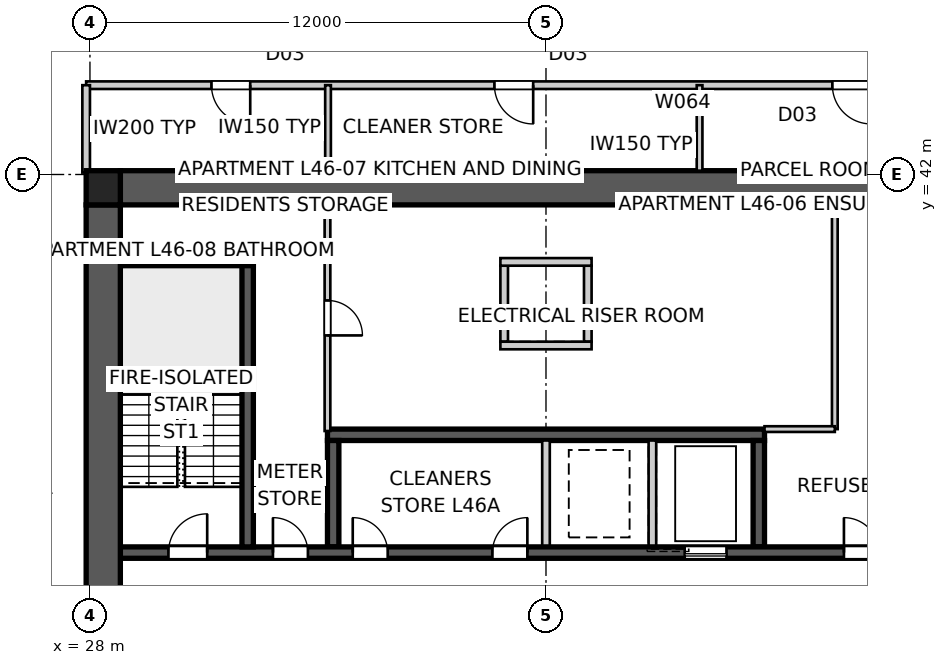
"""IFC4 building model, lengths in metres.
Left out: names, types, materials, properties, quantities, classifications, styles, units other than length and angle.
Written with IfcOpenShell. Run it as: python <this file> out.ifc"""

import sys

from ifc_helpers import new_model, si_unit, direction, frame, frame_2d, origin, origin_2d, place, context, subcontext, project, spatial, polyline, rectangle, outline, extrude, element, fill, save


model = new_model("IFC4")
c1 = context("Model", 3, precision=1e-05, world=origin(), true_north=direction((0.0, 1.0)))
c2 = subcontext(c1, "Body", "Model", "MODEL_VIEW")
j1 = project(units=[si_unit("LENGTHUNIT", "METRE"), si_unit("PLANEANGLEUNIT", "RADIAN")], contexts=[c1])
p1 = place(None, origin())
s1 = spatial("IfcSite", under=j1, at=p1, CompositionType="ELEMENT")
p2 = place(p1, origin())
s2 = spatial("IfcBuilding", under=s1, at=p2, CompositionType="ELEMENT")
p3 = place(p2, frame((0.0, 0.0, 167.6)))
s3 = spatial("IfcBuildingStorey", under=s2, at=p3, CompositionType="ELEMENT", Elevation=167.6)
p4 = place(p3, frame((28.8, 41.65, 0.0), z_axis=(0.0, 0.0, 1.0), x_axis=(1.0, 0.0, 0.0)))
e1 = element("IfcWall", 1, at=p4, inside=s3, PredefinedType="SHEAR", context=c2, shape_type="SweptSolid", body=[
    extrude(outline(polyline([(0.0, -0.45), (22.4, -0.45), (22.4, -0.025), (22.85, -0.025), (22.85, 0.025), (22.4, 0.025), (22.4, 0.45), (0.0, 0.45), (0.0, 0.025), (-0.45, 0.025), (-0.45, -0.025), (0.0, -0.025), (0.0, -0.45)])), origin(), (0.0, 0.0, 1.0), 3.4),
])
p5 = place(p3, frame((28.35, 41.2, 0.0), z_axis=(0.0, 0.0, 1.0), x_axis=(0.0, -1.0, 0.0)))
e2 = element("IfcWall", 2, at=p5, inside=s3, PredefinedType="SHEAR", context=c2, shape_type="SweptSolid", body=[
    extrude(outline(polyline([(0.0, -0.45), (22.4, -0.45), (22.4, -0.025), (22.85, -0.025), (22.85, 0.025), (22.4, 0.025), (22.4, 0.45), (0.0, 0.45), (0.0, 0.025), (-0.45, 0.025), (-0.45, -0.025), (0.0, -0.025), (0.0, -0.45)])), origin(), (0.0, 0.0, 1.0), 3.4),
])
p6 = place(p5, frame((11.14, 0.0, 0.0)))
e3 = element("IfcOpeningElement", 3, at=p6, cuts=e2, PredefinedType="OPENING", context=c2, shape_type="SweptSolid", body=[
    extrude(rectangle(XDim=1.02, YDim=2.4, at=frame_2d((0.51, 1.2))), frame((0.0, 0.46, 0.0), z_axis=(0.0, -1.0, 0.0), x_axis=(1.0, 0.0, 0.0)), (0.0, 0.0, 1.0), 0.92),
])
p7 = place(p3, frame((28.8, 32.05, 0.0), z_axis=(0.0, 0.0, 1.0), x_axis=(1.0, 0.0, 0.0)))
e4 = element("IfcWall", 4, at=p7, inside=s3, PredefinedType="SHEAR", context=c2, shape_type="SweptSolid", body=[
    extrude(rectangle(XDim=22.4, YDim=0.3, at=frame_2d((11.2, 0.0))), origin(), (0.0, 0.0, 1.0), 3.4),
])
p8 = place(p7, frame((19.04, 0.0, 0.0)))
e5 = element("IfcOpeningElement", 5, at=p8, cuts=e4, PredefinedType="OPENING", context=c2, shape_type="SweptSolid", body=[
    extrude(rectangle(XDim=0.92, YDim=2.1, at=frame_2d((0.46, 1.05))), frame((0.0, 0.16, 0.0), z_axis=(0.0, -1.0, 0.0), x_axis=(1.0, 0.0, 0.0)), (0.0, 0.0, 1.0), 0.32),
])
p9 = place(p7, frame((1.265, 0.0, 0.0)))
e6 = element("IfcOpeningElement", 6, at=p9, cuts=e4, PredefinedType="OPENING", context=c2, shape_type="SweptSolid", body=[
    extrude(rectangle(XDim=1.02, YDim=2.1, at=frame_2d((0.51, 1.05))), frame((0.0, 0.16, 0.0), z_axis=(0.0, -1.0, 0.0), x_axis=(1.0, 0.0, 0.0)), (0.0, 0.0, 1.0), 0.32),
])
p10 = place(p7, frame((4.015, 0.0, 0.0)))
e7 = element("IfcOpeningElement", 7, at=p10, cuts=e4, PredefinedType="OPENING", context=c2, shape_type="SweptSolid", body=[
    extrude(rectangle(XDim=0.92, YDim=2.1, at=frame_2d((0.46, 1.05))), frame((0.0, 0.16, 0.0), z_axis=(0.0, -1.0, 0.0), x_axis=(1.0, 0.0, 0.0)), (0.0, 0.0, 1.0), 0.32),
])
p11 = place(p7, frame((6.115, 0.0, 0.0)))
e8 = element("IfcOpeningElement", 8, at=p11, cuts=e4, PredefinedType="OPENING", context=c2, shape_type="SweptSolid", body=[
    extrude(rectangle(XDim=0.92, YDim=2.1, at=frame_2d((0.46, 1.05))), frame((0.0, 0.16, 0.0), z_axis=(0.0, -1.0, 0.0), x_axis=(1.0, 0.0, 0.0)), (0.0, 0.0, 1.0), 0.32),
])
p12 = place(p7, frame((9.79, 0.0, 0.0)))
e9 = element("IfcOpeningElement", 9, at=p12, cuts=e4, PredefinedType="OPENING", context=c2, shape_type="SweptSolid", body=[
    extrude(rectangle(XDim=0.92, YDim=2.1, at=frame_2d((0.46, 1.05))), frame((0.0, 0.16, 0.0), z_axis=(0.0, -1.0, 0.0), x_axis=(1.0, 0.0, 0.0)), (0.0, 0.0, 1.0), 0.32),
])
p13 = place(p7, frame((14.85, 0.0, 0.0)))
e10 = element("IfcOpeningElement", 10, at=p13, cuts=e4, PredefinedType="OPENING", context=c2, shape_type="SweptSolid", body=[
    extrude(rectangle(XDim=1.1, YDim=2.1, at=frame_2d((0.55, 1.05))), frame((0.0, 0.16, 0.0), z_axis=(0.0, -1.0, 0.0), x_axis=(1.0, 0.0, 0.0)), (0.0, 0.0, 1.0), 0.32),
])
p14 = place(p3, frame((34.25, 35.15, 0.0), z_axis=(0.0, 0.0, 1.0), x_axis=(1.0, 0.0, 0.0)))
e11 = element("IfcWall", 11, at=p14, inside=s3, PredefinedType="SHEAR", context=c2, shape_type="SweptSolid", body=[
    extrude(rectangle(XDim=11.5, YDim=0.3, at=frame_2d((5.75, 0.0))), origin(), (0.0, 0.0, 1.0), 3.4),
])
p15 = place(p3, frame((34.4, 32.2, 0.0), z_axis=(0.0, 0.0, 1.0), x_axis=(0.0, 1.0, 0.0)))
e12 = element("IfcWall", 12, at=p15, inside=s3, PredefinedType="SHEAR", context=c2, shape_type="SweptSolid", body=[
    extrude(rectangle(XDim=2.8, YDim=0.3, at=frame_2d((1.4, 0.0))), origin(), (0.0, 0.0, 1.0), 3.4),
])
for number, where, z_axis, x_axis in (
    (13, (40.0, 32.2, 0.0), (0.0, 0.0, 1.0), (0.0, 1.0, 0.0)),
    (14, (42.8, 32.2, 0.0), (0.0, 0.0, 1.0), (0.0, 1.0, 0.0)),
):
    element("IfcWall", number, at=place(p3, frame(where, z_axis=z_axis, x_axis=x_axis)), inside=s3, PredefinedType="SOLIDWALL", context=c2, shape_type="SweptSolid", body=[
        extrude(rectangle(XDim=2.8, YDim=0.2, at=frame_2d((1.4, 0.0))), origin(), (0.0, 0.0, 1.0), 3.4),
    ])
p16 = place(p3, frame((45.6, 32.2, 0.0), z_axis=(0.0, 0.0, 1.0), x_axis=(0.0, 1.0, 0.0)))
e15 = element("IfcWall", 15, at=p16, inside=s3, PredefinedType="SHEAR", context=c2, shape_type="SweptSolid", body=[
    extrude(rectangle(XDim=2.8, YDim=0.3, at=frame_2d((1.4, 0.0))), origin(), (0.0, 0.0, 1.0), 3.4),
])
p17 = place(p3, frame((32.15, 32.2, 0.0), z_axis=(0.0, 0.0, 1.0), x_axis=(0.0, 1.0, 0.0)))
e16 = element("IfcWall", 16, at=p17, inside=s3, PredefinedType="SHEAR", context=c2, shape_type="SweptSolid", body=[
    extrude(rectangle(XDim=7.7, YDim=0.3, at=frame_2d((3.85, 0.0))), origin(), (0.0, 0.0, 1.0), 3.4),
])
p18 = place(p3, frame((28.8, 39.75, 0.0), z_axis=(0.0, 0.0, 1.0), x_axis=(1.0, 0.0, 0.0)))
e17 = element("IfcWall", 17, at=p18, inside=s3, PredefinedType="SHEAR", context=c2, shape_type="SweptSolid", body=[
    extrude(rectangle(XDim=3.5, YDim=0.3, at=frame_2d((1.75, 0.0))), origin(), (0.0, 0.0, 1.0), 3.4),
])
for number, where, z_axis, x_axis in (
    (18, (38.9, 37.6, 0.0), (0.0, 0.0, 1.0), (0.0, 1.0, 0.0)),
    (19, (41.1, 37.6, 0.0), (0.0, 0.0, 1.0), (0.0, 1.0, 0.0)),
):
    element("IfcWall", number, at=place(p3, frame(where, z_axis=z_axis, x_axis=x_axis)), inside=s3, PredefinedType="SOLIDWALL", context=c2, shape_type="SweptSolid", body=[
        extrude(rectangle(XDim=2.0, YDim=0.2, at=frame_2d((1.0, 0.0))), origin(), (0.0, 0.0, 1.0), 3.4),
    ])
for number, where, z_axis, x_axis in (
    (20, (38.8, 37.5, 0.0), (0.0, 0.0, 1.0), (1.0, 0.0, 0.0)),
    (21, (38.8, 39.7, 0.0), (0.0, 0.0, 1.0), (1.0, 0.0, 0.0)),
):
    element("IfcWall", number, at=place(p3, frame(where, z_axis=z_axis, x_axis=x_axis)), inside=s3, PredefinedType="SOLIDWALL", context=c2, shape_type="SweptSolid", body=[
        extrude(rectangle(XDim=2.4, YDim=0.2, at=frame_2d((1.2, 0.0))), origin(), (0.0, 0.0, 1.0), 3.4),
    ])
p19 = place(p3, frame((28.35, 41.65, 0.0), z_axis=(0.0, 0.0, 1.0), x_axis=(1.0, 0.0, 0.0)))
e22 = element("IfcColumn", 22, at=p19, inside=s3, PredefinedType="COLUMN", context=c2, shape_type="SweptSolid", body=[
    extrude(rectangle(XDim=0.9, YDim=0.9, at=origin_2d()), origin(), (0.0, 0.0, 1.0), 3.4),
])
p20 = place(p3, frame((34.25, 41.2, 0.0), z_axis=(0.0, 0.0, 1.0), x_axis=(0.0, -1.0, 0.0)))
e23 = element("IfcWall", 23, at=p20, inside=s3, PredefinedType="SOLIDWALL", context=c2, shape_type="SweptSolid", body=[
    extrude(rectangle(XDim=5.95, YDim=0.15, at=frame_2d((2.975, 0.0))), origin(), (0.0, 0.0, 1.0), 3.2),
])
p21 = place(p20, frame((2.515, 0.0, 0.0)))
e24 = element("IfcOpeningElement", 24, at=p21, cuts=e23, PredefinedType="OPENING", context=c2, shape_type="SweptSolid", body=[
    extrude(rectangle(XDim=0.92, YDim=2.1, at=frame_2d((0.46, 1.05))), frame((0.0, 0.085, 0.0), z_axis=(0.0, -1.0, 0.0), x_axis=(1.0, 0.0, 0.0)), (0.0, 0.0, 1.0), 0.17),
])
p22 = place(p3, frame((47.6, 41.2, 0.0), z_axis=(0.0, 0.0, 1.0), x_axis=(0.0, -1.0, 0.0)))
e25 = element("IfcWall", 25, at=p22, inside=s3, PredefinedType="SOLIDWALL", context=c2, shape_type="SweptSolid", body=[
    extrude(rectangle(XDim=5.9, YDim=0.15, at=frame_2d((2.95, 0.0))), origin(), (0.0, 0.0, 1.0), 3.2),
])
p23 = place(p3, frame((47.6, 35.3, 0.0), z_axis=(0.0, 0.0, 1.0), x_axis=(-1.0, 0.0, 0.0)))
e26 = element("IfcWall", 26, at=p23, inside=s3, PredefinedType="SOLIDWALL", context=c2, shape_type="SweptSolid", body=[
    extrude(rectangle(XDim=1.85, YDim=0.15, at=frame_2d((0.925, 0.0))), origin(), (0.0, 0.0, 1.0), 3.2),
])
p24 = place(p3, frame((52.1, 44.35, 0.0), z_axis=(0.0, 0.0, 1.0), x_axis=(-1.0, 0.0, 0.0)))
e27 = element("IfcWall", 27, at=p24, inside=s3, PredefinedType="PARTITIONING", context=c2, shape_type="SweptSolid", body=[
    extrude(rectangle(XDim=24.2, YDim=0.2, at=frame_2d((12.1, 0.0))), origin(), (0.0, 0.0, 1.0), 3.2),
])
p25 = place(p24, frame((12.437, 0.0, 0.0)))
e28 = element("IfcOpeningElement", 28, at=p25, cuts=e27, PredefinedType="OPENING", context=c2, shape_type="SweptSolid", body=[
    extrude(rectangle(XDim=1.02, YDim=2.1, at=frame_2d((0.51, 1.05))), frame((0.0, 0.11, 0.0), z_axis=(0.0, -1.0, 0.0), x_axis=(1.0, 0.0, 0.0)), (0.0, 0.0, 1.0), 0.22),
])
p26 = place(p24, frame((3.544, 0.0, 0.0)))
e29 = element("IfcOpeningElement", 29, at=p26, cuts=e27, PredefinedType="OPENING", context=c2, shape_type="SweptSolid", body=[
    extrude(rectangle(XDim=1.02, YDim=2.1, at=frame_2d((0.51, 1.05))), frame((0.0, 0.11, 0.0), z_axis=(0.0, -1.0, 0.0), x_axis=(1.0, 0.0, 0.0)), (0.0, 0.0, 1.0), 0.22),
])
p27 = place(p24, frame((19.883, 0.0, 0.0)))
e30 = element("IfcOpeningElement", 30, at=p27, cuts=e27, PredefinedType="OPENING", context=c2, shape_type="SweptSolid", body=[
    extrude(rectangle(XDim=1.02, YDim=2.1, at=frame_2d((0.51, 1.05))), frame((0.0, 0.11, 0.0), z_axis=(0.0, -1.0, 0.0), x_axis=(1.0, 0.0, 0.0)), (0.0, 0.0, 1.0), 0.22),
])
p28 = place(p3, frame((27.9, 44.35, 0.0), z_axis=(0.0, 0.0, 1.0), x_axis=(0.0, -1.0, 0.0)))
e31 = element("IfcWall", 31, at=p28, inside=s3, PredefinedType="PARTITIONING", context=c2, shape_type="SweptSolid", body=[
    extrude(rectangle(XDim=2.3, YDim=0.2, at=frame_2d((1.15, 0.0))), origin(), (0.0, 0.0, 1.0), 3.2),
])
p29 = place(p3, frame((34.265, 42.1, 0.0), z_axis=(0.0, 0.0, 1.0), x_axis=(0.0, 1.0, 0.0)))
e32 = element("IfcWall", 32, at=p29, inside=s3, PredefinedType="SOLIDWALL", context=c2, shape_type="SweptSolid", body=[
    extrude(rectangle(XDim=2.25, YDim=0.15, at=frame_2d((1.125, 0.0))), origin(), (0.0, 0.0, 1.0), 2.672),
])
p30 = place(p3, frame((44.042, 42.1, 0.0), z_axis=(0.0, 0.0, 1.0), x_axis=(0.0, 1.0, 0.0)))
e33 = element("IfcWall", 33, at=p30, inside=s3, PredefinedType="SOLIDWALL", context=c2, shape_type="SweptSolid", body=[
    extrude(rectangle(XDim=2.25, YDim=0.15, at=frame_2d((1.125, 0.0))), origin(), (0.0, 0.0, 1.0), 3.2),
])
p31 = place(p8, origin())
e34 = element("IfcDoor", 34, at=p31, inside=s3, OperationType="SINGLE_SWING_LEFT", PredefinedType="DOOR", context=c2, shape_type="SweptSolid", body=[
    extrude(rectangle(XDim=0.92, YDim=2.1, at=frame_2d((0.46, 1.05))), frame((0.0, 0.025, 0.0), z_axis=(0.0, -1.0, 0.0), x_axis=(1.0, 0.0, 0.0)), (0.0, 0.0, 1.0), 0.05),
])
fill(e5, e34)
p32 = place(p9, origin())
e35 = element("IfcDoor", 35, at=p32, inside=s3, OperationType="SINGLE_SWING_RIGHT", PredefinedType="DOOR", context=c2, shape_type="SweptSolid", body=[
    extrude(rectangle(XDim=1.02, YDim=2.1, at=frame_2d((0.51, 1.05))), frame((0.0, 0.025, 0.0), z_axis=(0.0, -1.0, 0.0), x_axis=(1.0, 0.0, 0.0)), (0.0, 0.0, 1.0), 0.05),
])
fill(e6, e35)
p33 = place(p10, origin())
e36 = element("IfcDoor", 36, at=p33, inside=s3, OperationType="SINGLE_SWING_LEFT", PredefinedType="DOOR", context=c2, shape_type="SweptSolid", body=[
    extrude(rectangle(XDim=0.92, YDim=2.1, at=frame_2d((0.46, 1.05))), frame((0.0, 0.025, 0.0), z_axis=(0.0, -1.0, 0.0), x_axis=(1.0, 0.0, 0.0)), (0.0, 0.0, 1.0), 0.05),
])
fill(e7, e36)
p34 = place(p25, origin())
e37 = element("IfcDoor", 37, at=p34, inside=s3, OperationType="SINGLE_SWING_LEFT", PredefinedType="DOOR", context=c2, shape_type="SweptSolid", body=[
    extrude(rectangle(XDim=1.02, YDim=2.1, at=frame_2d((0.51, 1.05))), frame((0.0, 0.025, 0.0), z_axis=(0.0, -1.0, 0.0), x_axis=(1.0, 0.0, 0.0)), (0.0, 0.0, 1.0), 0.05),
])
fill(e28, e37)
p35 = place(p26, origin())
e38 = element("IfcDoor", 38, at=p35, inside=s3, OperationType="SINGLE_SWING_LEFT", PredefinedType="DOOR", context=c2, shape_type="SweptSolid", body=[
    extrude(rectangle(XDim=1.02, YDim=2.1, at=frame_2d((0.51, 1.05))), frame((0.0, 0.025, 0.0), z_axis=(0.0, -1.0, 0.0), x_axis=(1.0, 0.0, 0.0)), (0.0, 0.0, 1.0), 0.05),
])
fill(e29, e38)
p36 = place(p27, origin())
e39 = element("IfcDoor", 39, at=p36, inside=s3, OperationType="SINGLE_SWING_LEFT", PredefinedType="DOOR", context=c2, shape_type="SweptSolid", body=[
    extrude(rectangle(XDim=1.02, YDim=2.1, at=frame_2d((0.51, 1.05))), frame((0.0, 0.025, 0.0), z_axis=(0.0, -1.0, 0.0), x_axis=(1.0, 0.0, 0.0)), (0.0, 0.0, 1.0), 0.05),
])
fill(e30, e39)
p37 = place(p21, origin())
e40 = element("IfcDoor", 40, at=p37, inside=s3, OperationType="SINGLE_SWING_RIGHT", PredefinedType="DOOR", context=c2, shape_type="SweptSolid", body=[
    extrude(rectangle(XDim=0.92, YDim=2.1, at=frame_2d((0.46, 1.05))), frame((0.0, 0.025, 0.0), z_axis=(0.0, -1.0, 0.0), x_axis=(1.0, 0.0, 0.0)), (0.0, 0.0, 1.0), 0.05),
])
fill(e24, e40)
p38 = place(p11, origin())
e41 = element("IfcDoor", 41, at=p38, inside=s3, OperationType="SINGLE_SWING_LEFT", PredefinedType="DOOR", context=c2, shape_type="SweptSolid", body=[
    extrude(rectangle(XDim=0.92, YDim=2.1, at=frame_2d((0.46, 1.05))), frame((0.0, 0.025, 0.0), z_axis=(0.0, -1.0, 0.0), x_axis=(1.0, 0.0, 0.0)), (0.0, 0.0, 1.0), 0.05),
])
fill(e8, e41)
p39 = place(p12, origin())
e42 = element("IfcDoor", 42, at=p39, inside=s3, OperationType="SINGLE_SWING_RIGHT", PredefinedType="DOOR", context=c2, shape_type="SweptSolid", body=[
    extrude(rectangle(XDim=0.92, YDim=2.1, at=frame_2d((0.46, 1.05))), frame((0.0, 0.025, 0.0), z_axis=(0.0, -1.0, 0.0), x_axis=(1.0, 0.0, 0.0)), (0.0, 0.0, 1.0), 0.05),
])
fill(e9, e42)
p40 = place(p13, origin())
e43 = element("IfcDoor", 43, at=p40, inside=s3, OperationType="SLIDING_TO_LEFT", PredefinedType="DOOR", context=c2, shape_type="SweptSolid", body=[
    extrude(rectangle(XDim=1.1, YDim=2.1, at=frame_2d((0.55, 1.05))), frame((0.0, 0.025, 0.0), z_axis=(0.0, -1.0, 0.0), x_axis=(1.0, 0.0, 0.0)), (0.0, 0.0, 1.0), 0.05),
])
fill(e10, e43)
save(model, sys.argv[1])
